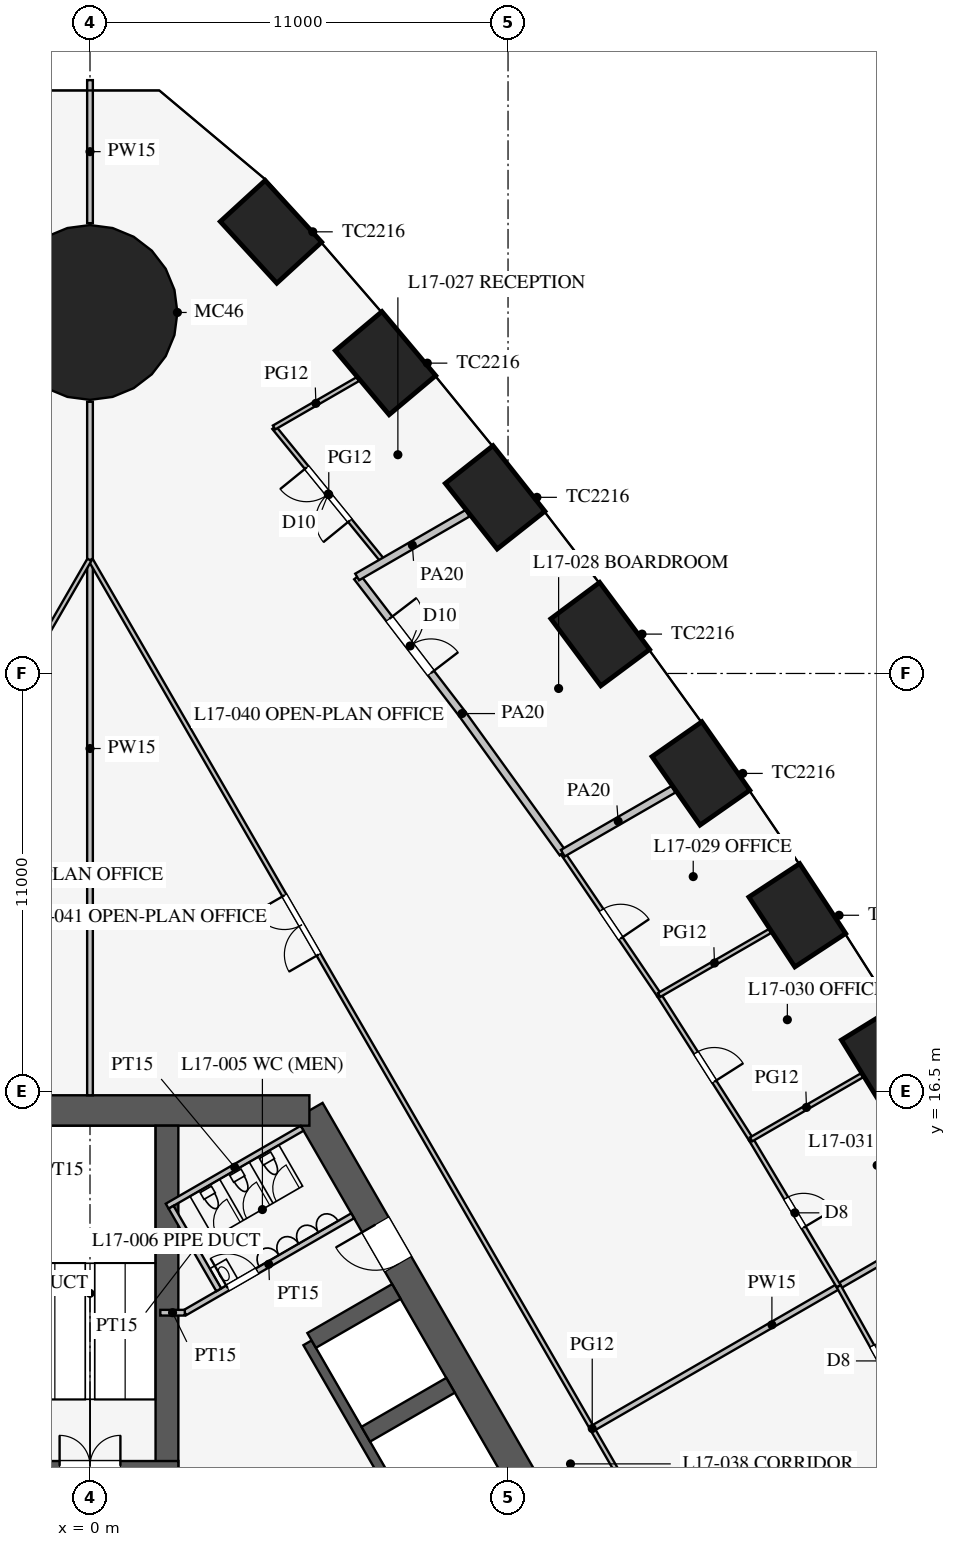
"""IFC4 building model, lengths in metres.
Left out: names, types, materials, properties, quantities, classifications, styles, units other than length and angle.
Written with IfcOpenShell. Run it as: python <this file> out.ifc"""

import sys

from ifc_helpers import new_model, si_unit, direction, frame, frame_2d, origin, origin_2d, place, context, subcontext, project, spatial, rectangle, circle, extrude, element, fill, save


model = new_model("IFC4")
c1 = context("Model", 3, precision=1e-05, world=origin(), true_north=direction((0.0, 1.0)))
c2 = subcontext(c1, "Body", "Model", "MODEL_VIEW")
j1 = project(units=[si_unit("LENGTHUNIT", "METRE"), si_unit("PLANEANGLEUNIT", "RADIAN")], contexts=[c1])
p1 = place(None, origin())
s1 = spatial("IfcSite", under=j1, at=p1, CompositionType="ELEMENT")
p2 = place(p1, origin())
s2 = spatial("IfcBuilding", under=s1, at=p2, CompositionType="ELEMENT")
p3 = place(p2, frame((0.0, 0.0, 75.3)))
s3 = spatial("IfcBuildingStorey", under=s2, at=p3, CompositionType="ELEMENT", Elevation=75.3)
for number, where, z_axis, x_axis in (
    (1, (21.031, 17.339, 0.0), (0.0, 0.0, 1.0), (-0.525, 0.851, 0.0)),
    (2, (18.611, 21.137, 0.0), (0.0, 0.0, 1.0), (-0.549, 0.836, 0.0)),
    (3, (16.076, 24.87, 0.0), (0.0, 0.0, 1.0), (-0.574, 0.819, 0.0)),
    (4, (13.426, 28.536, 0.0), (0.0, 0.0, 1.0), (-0.597, 0.802, 0.0)),
    (5, (10.66, 32.135, 0.0), (0.0, 0.0, 1.0), (-0.62, 0.784, 0.0)),
    (6, (7.776, 35.667, 0.0), (0.0, 0.0, 1.0), (-0.643, 0.766, 0.0)),
    (7, (4.762, 39.122, 0.0), (0.0, 0.0, 1.0), (-0.676, 0.737, 0.0)),
):
    element("IfcColumn", number, at=place(p3, frame(where, z_axis=z_axis, x_axis=x_axis)), inside=s3, PredefinedType="COLUMN", context=c2, shape_type="SweptSolid", body=[
        extrude(rectangle(XDim=2.2, YDim=1.6, at=origin_2d()), origin(), (0.0, 0.0, 1.0), 4.2),
    ])
p4 = place(p3, frame((0.0, 37.0, 0.0), z_axis=(0.0, 0.0, 1.0), x_axis=(1.0, 0.0, 0.0)))
e8 = element("IfcColumn", 8, at=p4, inside=s3, PredefinedType="COLUMN", context=c2, shape_type="SweptSolid", body=[
    extrude(circle(Radius=2.3, at=origin_2d()), origin(), (0.0, 0.0, 1.0), 4.2),
])
p5 = place(p3, frame((16.743, -3.0, 0.0), z_axis=(0.0, 0.0, 1.0), x_axis=(-0.500002442456, 0.866023993627, 0.0)))
e9 = element("IfcWall", 9, at=p5, inside=s3, PredefinedType="SHEAR", context=c2, shape_type="SweptSolid", body=[
    extrude(rectangle(XDim=21.939, YDim=0.8, at=frame_2d((10.97, 0.0))), origin(), (0.0, 0.0, 1.0), 4.2),
])
p6 = place(p5, frame((17.27, 0.0, 0.0)))
e10 = element("IfcOpeningElement", 10, at=p6, cuts=e9, PredefinedType="OPENING", context=c2, shape_type="SweptSolid", body=[
    extrude(rectangle(XDim=1.2, YDim=2.1, at=frame_2d((0.6, 1.05))), frame((0.0, 0.41, 0.0), z_axis=(0.0, -1.0, 0.0), x_axis=(1.0, 0.0, 0.0)), (0.0, 0.0, 1.0), 0.82),
])
p7 = place(p5, frame((3.47, 0.0, 0.0)))
e11 = element("IfcOpeningElement", 11, at=p7, cuts=e9, PredefinedType="OPENING", context=c2, shape_type="SweptSolid", body=[
    extrude(rectangle(XDim=1.2, YDim=2.1, at=frame_2d((0.6, 1.05))), frame((0.0, 0.41, 0.0), z_axis=(0.0, -1.0, 0.0), x_axis=(1.0, 0.0, 0.0)), (0.0, 0.0, 1.0), 0.82),
])
p8 = place(p3, frame((5.773, 16.0, 0.0), z_axis=(0.0, 0.0, 1.0), x_axis=(-1.0, 0.0, 0.0)))
e12 = element("IfcWall", 12, at=p8, inside=s3, PredefinedType="SHEAR", context=c2, shape_type="SweptSolid", body=[
    extrude(rectangle(XDim=11.547, YDim=0.8, at=frame_2d((5.773, 0.0))), origin(), (0.0, 0.0, 1.0), 4.2),
])
p9 = place(p3, frame((11.424, 0.014, 0.0), z_axis=(0.0, 0.0, 1.0), x_axis=(-0.500001763848, 0.866024385424, 0.0)))
e13 = element("IfcWall", 13, at=p9, inside=s3, PredefinedType="SHEAR", context=c2, shape_type="SweptSolid", body=[
    extrude(rectangle(XDim=11.4, YDim=0.25, at=frame_2d((5.7, 0.0))), origin(), (0.0, 0.0, 1.0), 4.2),
])
p10 = place(p3, frame((7.257, 7.481, 0.0), z_axis=(0.0, 0.0, 1.0), x_axis=(0.866046643894, 0.499963209246, 0.0)))
e14 = element("IfcWall", 14, at=p10, inside=s3, PredefinedType="SHEAR", context=c2, shape_type="SweptSolid", body=[
    extrude(rectangle(XDim=2.575, YDim=0.45, at=frame_2d((1.288, 0.0))), origin(), (0.0, 0.0, 1.0), 4.2),
])
p11 = place(p3, frame((5.832, 9.949, 0.0), z_axis=(0.0, 0.0, 1.0), x_axis=(0.866029291668, 0.499993265928, 0.0)))
e15 = element("IfcWall", 15, at=p11, inside=s3, PredefinedType="SHEAR", context=c2, shape_type="SweptSolid", body=[
    extrude(rectangle(XDim=2.575, YDim=0.45, at=frame_2d((1.288, 0.0))), origin(), (0.0, 0.0, 1.0), 4.2),
])
p12 = place(p3, frame((2.025, 6.525, 0.0), z_axis=(0.0, 0.0, 1.0), x_axis=(0.0, 1.0, 0.0)))
e16 = element("IfcWall", 16, at=p12, inside=s3, PredefinedType="SHEAR", context=c2, shape_type="SweptSolid", body=[
    extrude(rectangle(XDim=9.075, YDim=0.6, at=frame_2d((4.538, 0.0))), origin(), (0.0, 0.0, 1.0), 4.2),
])
p13 = place(p3, frame((2.325, 6.65, 0.0), z_axis=(0.0, 0.0, 1.0), x_axis=(-1.0, 0.0, 0.0)))
e17 = element("IfcWall", 17, at=p13, inside=s3, PredefinedType="SHEAR", context=c2, shape_type="SweptSolid", body=[
    extrude(rectangle(XDim=4.65, YDim=0.25, at=frame_2d((2.325, 0.0))), origin(), (0.0, 0.0, 1.0), 4.2),
])
p14 = place(p13, frame((1.525, 0.0, 0.0)))
e18 = element("IfcOpeningElement", 18, at=p14, cuts=e17, PredefinedType="OPENING", context=c2, shape_type="SweptSolid", body=[
    extrude(rectangle(XDim=1.6, YDim=2.1, at=frame_2d((0.8, 1.05))), frame((0.0, 0.135, 0.0), z_axis=(0.0, -1.0, 0.0), x_axis=(1.0, 0.0, 0.0)), (0.0, 0.0, 1.0), 0.27),
])
p15 = place(p3, frame((2.495, 10.678, 0.0), z_axis=(0.0, 0.0, 1.0), x_axis=(0.86602216432, 0.500005610874, 0.0)))
e19 = element("IfcWall", 19, at=p15, inside=s3, PredefinedType="PARTITIONING", context=c2, shape_type="SweptSolid", body=[
    extrude(rectangle(XDim=5.1, YDim=0.15, at=frame_2d((2.55, 0.0))), origin(), (0.0, 0.0, 1.0), 4.0),
])
p16 = place(p15, frame((1.3, 0.0, 0.0)))
e20 = element("IfcOpeningElement", 20, at=p16, cuts=e19, PredefinedType="OPENING", context=c2, shape_type="SweptSolid", body=[
    extrude(rectangle(XDim=0.9, YDim=2.1, at=frame_2d((0.45, 1.05))), frame((0.0, 0.085, 0.0), z_axis=(0.0, -1.0, 0.0), x_axis=(1.0, 0.0, 0.0)), (0.0, 0.0, 1.0), 0.17),
])
p17 = place(p3, frame((2.495, 10.678, 0.0), z_axis=(0.0, 0.0, 1.0), x_axis=(-1.0, 0.0, 0.0)))
e21 = element("IfcWall", 21, at=p17, inside=s3, PredefinedType="PARTITIONING", context=c2, shape_type="SweptSolid", body=[
    extrude(rectangle(XDim=0.645, YDim=0.15, at=frame_2d((0.323, 0.0))), origin(), (0.0, 0.0, 1.0), 4.0),
])
p18 = place(p3, frame((2.031, 13.482, 0.0), z_axis=(0.0, 0.0, 1.0), x_axis=(0.866050731258, 0.499956128963, 0.0)))
e22 = element("IfcWall", 22, at=p18, inside=s3, PredefinedType="PARTITIONING", context=c2, shape_type="SweptSolid", body=[
    extrude(rectangle(XDim=4.1, YDim=0.15, at=frame_2d((2.05, 0.0))), origin(), (0.0, 0.0, 1.0), 4.0),
])
p19 = place(p3, frame((3.389, 11.281, 0.0), z_axis=(0.0, 0.0, 1.0), x_axis=(-0.499989096993, 0.866031698547, 0.0)))
e23 = element("IfcWall", 23, at=p19, inside=s3, PredefinedType="PARTITIONING", context=c2, shape_type="SweptSolid", body=[
    extrude(rectangle(XDim=2.51, YDim=0.15, at=frame_2d((1.255, 0.0))), origin(), (0.0, 0.0, 1.0), 4.0),
])
p20 = place(p3, frame((0.0, 16.4, 0.0), z_axis=(0.0, 0.0, 1.0), x_axis=(0.0, 1.0, 0.0)))
e24 = element("IfcWall", 24, at=p20, inside=s3, PredefinedType="PARTITIONING", context=c2, shape_type="SweptSolid", body=[
    extrude(rectangle(XDim=18.25, YDim=0.15, at=frame_2d((9.125, 0.0))), origin(), (0.0, 0.0, 1.0), 2.3),
])
p21 = place(p3, frame((0.0, 39.35, 0.0), z_axis=(0.0, 0.0, 1.0), x_axis=(0.0, 1.0, 0.0)))
e25 = element("IfcWall", 25, at=p21, inside=s3, PredefinedType="PARTITIONING", context=c2, shape_type="SweptSolid", body=[
    extrude(rectangle(XDim=3.764, YDim=0.15, at=frame_2d((1.882, 0.0))), origin(), (0.0, 0.0, 1.0), 2.3),
])
p22 = place(p3, frame((13.268, 7.66, 0.0), z_axis=(0.0, 0.0, 1.0), x_axis=(0.866019550038, 0.50001013885, 0.0)))
e26 = element("IfcWall", 26, at=p22, inside=s3, PredefinedType="PARTITIONING", context=c2, shape_type="SweptSolid", body=[
    extrude(rectangle(XDim=10.799, YDim=0.15, at=frame_2d((5.399, 0.0))), origin(), (0.0, 0.0, 1.0), 2.8),
])
p23 = place(p3, frame((26.415, -15.231, 0.0), z_axis=(0.0, 0.0, 1.0), x_axis=(-0.50000091641, 0.866024874695, 0.0)))
e27 = element("IfcWall", 27, at=p23, inside=s3, PredefinedType="PARTITIONING", context=c2, shape_type="SweptSolid", body=[
    extrude(rectangle(XDim=52.796, YDim=0.12, at=frame_2d((26.398, 0.0))), origin(), (0.0, 0.0, 1.0), 2.9),
])
p24 = place(p23, frame((10.2, 0.0, 0.15)))
e28 = element("IfcOpeningElement", 28, at=p24, cuts=e27, PredefinedType="OPENING", context=c2, shape_type="SweptSolid", body=[
    extrude(rectangle(XDim=1.8, YDim=2.1, at=frame_2d((0.9, 1.05))), frame((0.0, 0.07, 0.0), z_axis=(0.0, -1.0, 0.0), x_axis=(1.0, 0.0, 0.0)), (0.0, 0.0, 1.0), 0.14),
])
p25 = place(p23, frame((40.8, 0.0, 0.15)))
e29 = element("IfcOpeningElement", 29, at=p25, cuts=e27, PredefinedType="OPENING", context=c2, shape_type="SweptSolid", body=[
    extrude(rectangle(XDim=1.8, YDim=2.1, at=frame_2d((0.9, 1.05))), frame((0.0, 0.07, 0.0), z_axis=(0.0, -1.0, 0.0), x_axis=(1.0, 0.0, 0.0)), (0.0, 0.0, 1.0), 0.14),
])
p26 = place(p3, frame((19.701, 11.374, 0.0), z_axis=(0.0, 0.0, 1.0), x_axis=(-0.512483962191, 0.858696796604, 0.0)))
e30 = element("IfcWall", 30, at=p26, inside=s3, PredefinedType="PARTITIONING", context=c2, shape_type="SweptSolid", body=[
    extrude(rectangle(XDim=4.5, YDim=0.12, at=frame_2d((2.25, 0.0))), origin(), (0.0, 0.0, 1.0), 2.9),
])
p27 = place(p26, frame((1.8, 0.0, 0.15)))
e31 = element("IfcOpeningElement", 31, at=p27, cuts=e30, PredefinedType="OPENING", context=c2, shape_type="SweptSolid", body=[
    extrude(rectangle(XDim=0.9, YDim=2.1, at=frame_2d((0.45, 1.05))), frame((0.0, 0.07, 0.0), z_axis=(0.0, -1.0, 0.0), x_axis=(1.0, 0.0, 0.0)), (0.0, 0.0, 1.0), 0.14),
])
p28 = place(p3, frame((12.441, 22.771, 0.0), z_axis=(0.0, 0.0, 1.0), x_axis=(-0.585376255171, 0.810761765183, 0.0)))
e32 = element("IfcWall", 32, at=p28, inside=s3, PredefinedType="PARTITIONING", context=c2, shape_type="SweptSolid", body=[
    extrude(rectangle(XDim=4.523, YDim=0.2, at=frame_2d((2.262, 0.0))), origin(), (0.0, 0.0, 1.0), 2.9),
])
p29 = place(p3, frame((9.793, 26.439, 0.0), z_axis=(0.0, 0.0, 1.0), x_axis=(-0.608784932975, 0.79333530451, 0.0)))
e33 = element("IfcWall", 33, at=p29, inside=s3, PredefinedType="PARTITIONING", context=c2, shape_type="SweptSolid", body=[
    extrude(rectangle(XDim=4.539, YDim=0.2, at=frame_2d((2.27, 0.0))), origin(), (0.0, 0.0, 1.0), 2.9),
])
p30 = place(p29, frame((1.35, 0.0, 0.15)))
e34 = element("IfcOpeningElement", 34, at=p30, cuts=e33, PredefinedType="OPENING", context=c2, shape_type="SweptSolid", body=[
    extrude(rectangle(XDim=1.8, YDim=2.1, at=frame_2d((0.9, 1.05))), frame((0.0, 0.11, 0.0), z_axis=(0.0, -1.0, 0.0), x_axis=(1.0, 0.0, 0.0)), (0.0, 0.0, 1.0), 0.22),
])
p31 = place(p3, frame((7.723, 30.439, 0.0), z_axis=(0.0, 0.0, 1.0), x_axis=(-0.631807650035, 0.775125211406, 0.0)))
e35 = element("IfcWall", 35, at=p31, inside=s3, PredefinedType="PARTITIONING", context=c2, shape_type="SweptSolid", body=[
    extrude(rectangle(XDim=4.559, YDim=0.12, at=frame_2d((2.279, 0.0))), origin(), (0.0, 0.0, 1.0), 2.9),
])
p32 = place(p31, frame((1.4, 0.0, 0.15)))
e36 = element("IfcOpeningElement", 36, at=p32, cuts=e35, PredefinedType="OPENING", context=c2, shape_type="SweptSolid", body=[
    extrude(rectangle(XDim=1.8, YDim=2.1, at=frame_2d((0.9, 1.05))), frame((0.0, 0.07, 0.0), z_axis=(0.0, -1.0, 0.0), x_axis=(1.0, 0.0, 0.0)), (0.0, 0.0, 1.0), 0.14),
])
p33 = place(p3, frame((17.395, 15.239, 0.0), z_axis=(0.0, 0.0, 1.0), x_axis=(-0.537243691336, 0.843427066272, 0.0)))
e37 = element("IfcWall", 37, at=p33, inside=s3, PredefinedType="PARTITIONING", context=c2, shape_type="SweptSolid", body=[
    extrude(rectangle(XDim=4.504, YDim=0.12, at=frame_2d((2.252, 0.0))), origin(), (0.0, 0.0, 1.0), 2.9),
])
p34 = place(p33, frame((1.8, 0.0, 0.15)))
e38 = element("IfcOpeningElement", 38, at=p34, cuts=e37, PredefinedType="OPENING", context=c2, shape_type="SweptSolid", body=[
    extrude(rectangle(XDim=0.9, YDim=2.1, at=frame_2d((0.45, 1.05))), frame((0.0, 0.07, 0.0), z_axis=(0.0, -1.0, 0.0), x_axis=(1.0, 0.0, 0.0)), (0.0, 0.0, 1.0), 0.14),
])
p35 = place(p3, frame((14.975, 19.038, 0.0), z_axis=(0.0, 0.0, 1.0), x_axis=(-0.561512004239, 0.827468591002, 0.0)))
e39 = element("IfcWall", 39, at=p35, inside=s3, PredefinedType="PARTITIONING", context=c2, shape_type="SweptSolid", body=[
    extrude(rectangle(XDim=4.512, YDim=0.12, at=frame_2d((2.256, 0.0))), origin(), (0.0, 0.0, 1.0), 2.9),
])
p36 = place(p35, frame((1.8, 0.0, 0.15)))
e40 = element("IfcOpeningElement", 40, at=p36, cuts=e39, PredefinedType="OPENING", context=c2, shape_type="SweptSolid", body=[
    extrude(rectangle(XDim=0.9, YDim=2.1, at=frame_2d((0.45, 1.05))), frame((0.0, 0.07, 0.0), z_axis=(0.0, -1.0, 0.0), x_axis=(1.0, 0.0, 0.0)), (0.0, 0.0, 1.0), 0.14),
])
p37 = place(p3, frame((21.895, 7.445, 0.0), z_axis=(0.0, 0.0, 1.0), x_axis=(-0.487415216275, 0.87317031955, 0.0)))
e41 = element("IfcWall", 41, at=p37, inside=s3, PredefinedType="PARTITIONING", context=c2, shape_type="SweptSolid", body=[
    extrude(rectangle(XDim=4.5, YDim=0.12, at=frame_2d((2.25, 0.0))), origin(), (0.0, 0.0, 1.0), 2.9),
])
p38 = place(p37, frame((1.8, 0.0, 0.15)))
e42 = element("IfcOpeningElement", 42, at=p38, cuts=e41, PredefinedType="OPENING", context=c2, shape_type="SweptSolid", body=[
    extrude(rectangle(XDim=0.9, YDim=2.1, at=frame_2d((0.45, 1.05))), frame((0.0, 0.07, 0.0), z_axis=(0.0, -1.0, 0.0), x_axis=(1.0, 0.0, 0.0)), (0.0, 0.0, 1.0), 0.14),
])
p39 = place(p3, frame((12.441, 22.771, 0.0), z_axis=(0.0, 0.0, 1.0), x_axis=(0.865992196602, 0.500057512117, 0.0)))
e43 = element("IfcWall", 43, at=p39, inside=s3, PredefinedType="PARTITIONING", context=c2, shape_type="SweptSolid", body=[
    extrude(rectangle(XDim=3.364, YDim=0.2, at=frame_2d((1.682, 0.0))), origin(), (0.0, 0.0, 1.0), 2.6),
])
p40 = place(p3, frame((7.03, 30.04, 0.0), z_axis=(0.0, 0.0, 1.0), x_axis=(0.866038859646, 0.49997669304, 0.0)))
e44 = element("IfcWall", 44, at=p40, inside=s3, PredefinedType="PARTITIONING", context=c2, shape_type="SweptSolid", body=[
    extrude(rectangle(XDim=3.353, YDim=0.2, at=frame_2d((1.676, 0.0))), origin(), (0.0, 0.0, 1.0), 2.8),
])
p41 = place(p3, frame((4.843, 33.973, 0.0), z_axis=(0.0, 0.0, 1.0), x_axis=(0.866014639343, 0.500018644096, 0.0)))
e45 = element("IfcWall", 45, at=p41, inside=s3, PredefinedType="PARTITIONING", context=c2, shape_type="SweptSolid", body=[
    extrude(rectangle(XDim=2.545, YDim=0.12, at=frame_2d((1.272, 0.0))), origin(), (0.0, 0.0, 1.0), 2.9),
])
p42 = place(p3, frame((17.395, 15.239, 0.0), z_axis=(0.0, 0.0, 1.0), x_axis=(0.865991297194, 0.500059069696, 0.0)))
e46 = element("IfcWall", 46, at=p42, inside=s3, PredefinedType="PARTITIONING", context=c2, shape_type="SweptSolid", body=[
    extrude(rectangle(XDim=3.369, YDim=0.12, at=frame_2d((1.685, 0.0))), origin(), (0.0, 0.0, 1.0), 2.8),
])
p43 = place(p3, frame((14.975, 19.038, 0.0), z_axis=(0.0, 0.0, 1.0), x_axis=(0.866039498442, 0.499975586543, 0.0)))
e47 = element("IfcWall", 47, at=p43, inside=s3, PredefinedType="PARTITIONING", context=c2, shape_type="SweptSolid", body=[
    extrude(rectangle(XDim=3.367, YDim=0.12, at=frame_2d((1.684, 0.0))), origin(), (0.0, 0.0, 1.0), 2.8),
])
p44 = place(p3, frame((-0.016, 30.491, 0.0), z_axis=(0.0, 0.0, 1.0), x_axis=(-0.50000091641, -0.866024874695, 0.0)))
e48 = element("IfcWall", 48, at=p44, inside=s3, PredefinedType="PARTITIONING", context=c2, shape_type="SweptSolid", body=[
    extrude(rectangle(XDim=52.796, YDim=0.12, at=frame_2d((26.398, 0.0))), origin(), (0.0, 0.0, 1.0), 2.9),
])
p45 = place(p44, frame((10.2, 0.0, 0.15)))
e49 = element("IfcOpeningElement", 49, at=p45, cuts=e48, PredefinedType="OPENING", context=c2, shape_type="SweptSolid", body=[
    extrude(rectangle(XDim=1.8, YDim=2.1, at=frame_2d((0.9, 1.05))), frame((0.0, 0.07, 0.0), z_axis=(0.0, -1.0, 0.0), x_axis=(1.0, 0.0, 0.0)), (0.0, 0.0, 1.0), 0.14),
])
p46 = place(p44, frame((40.8, 0.0, 0.15)))
e50 = element("IfcOpeningElement", 50, at=p46, cuts=e48, PredefinedType="OPENING", context=c2, shape_type="SweptSolid", body=[
    extrude(rectangle(XDim=1.8, YDim=2.1, at=frame_2d((0.9, 1.05))), frame((0.0, 0.07, 0.0), z_axis=(0.0, -1.0, 0.0), x_axis=(1.0, 0.0, 0.0)), (0.0, 0.0, 1.0), 0.14),
])
p47 = place(p16, origin())
e51 = element("IfcDoor", 51, at=p47, inside=s3, OperationType="SINGLE_SWING_LEFT", PredefinedType="DOOR", context=c2, shape_type="SweptSolid", body=[
    extrude(rectangle(XDim=0.9, YDim=2.1, at=frame_2d((0.45, 1.05))), frame((0.0, 0.025, 0.0), z_axis=(0.0, -1.0, 0.0), x_axis=(1.0, 0.0, 0.0)), (0.0, 0.0, 1.0), 0.05),
])
fill(e20, e51)
p48 = place(p14, frame((1.6, 0.0, 0.0), z_axis=(0.0, 0.0, 1.0), x_axis=(-1.0, 0.0, 0.0)))
e52 = element("IfcDoor", 52, at=p48, inside=s3, OperationType="DOUBLE_DOOR_SINGLE_SWING", PredefinedType="DOOR", context=c2, shape_type="SweptSolid", body=[
    extrude(rectangle(XDim=1.6, YDim=2.1, at=frame_2d((0.8, 1.05))), frame((0.0, 0.025, 0.0), z_axis=(0.0, -1.0, 0.0), x_axis=(1.0, 0.0, 0.0)), (0.0, 0.0, 1.0), 0.05),
])
fill(e18, e52)
p49 = place(p6, origin())
e53 = element("IfcDoor", 53, at=p49, inside=s3, OperationType="SINGLE_SWING_RIGHT", PredefinedType="DOOR", context=c2, shape_type="SweptSolid", body=[
    extrude(rectangle(XDim=1.2, YDim=2.1, at=frame_2d((0.6, 1.05))), frame((0.0, 0.025, 0.0), z_axis=(0.0, -1.0, 0.0), x_axis=(1.0, 0.0, 0.0)), (0.0, 0.0, 1.0), 0.05),
])
fill(e10, e53)
p50 = place(p32, origin())
e54 = element("IfcDoor", 54, at=p50, inside=s3, OperationType="DOUBLE_DOOR_SINGLE_SWING", PredefinedType="DOOR", context=c2, shape_type="SweptSolid", body=[
    extrude(rectangle(XDim=1.8, YDim=2.1, at=frame_2d((0.9, 1.05))), frame((0.0, 0.025, 0.0), z_axis=(0.0, -1.0, 0.0), x_axis=(1.0, 0.0, 0.0)), (0.0, 0.0, 1.0), 0.05),
])
fill(e36, e54)
p51 = place(p30, frame((1.8, 0.0, 0.0), z_axis=(0.0, 0.0, 1.0), x_axis=(-1.0, 0.0, 0.0)))
e55 = element("IfcDoor", 55, at=p51, inside=s3, OperationType="DOUBLE_DOOR_SINGLE_SWING", PredefinedType="DOOR", context=c2, shape_type="SweptSolid", body=[
    extrude(rectangle(XDim=1.8, YDim=2.1, at=frame_2d((0.9, 1.05))), frame((0.0, 0.025, 0.0), z_axis=(0.0, -1.0, 0.0), x_axis=(1.0, 0.0, 0.0)), (0.0, 0.0, 1.0), 0.05),
])
fill(e34, e55)
p52 = place(p36, frame((0.9, 0.0, 0.0), z_axis=(0.0, 0.0, 1.0), x_axis=(-1.0, 0.0, 0.0)))
e56 = element("IfcDoor", 56, at=p52, inside=s3, OperationType="SINGLE_SWING_RIGHT", PredefinedType="DOOR", context=c2, shape_type="SweptSolid", body=[
    extrude(rectangle(XDim=0.9, YDim=2.1, at=frame_2d((0.45, 1.05))), frame((0.0, 0.025, 0.0), z_axis=(0.0, -1.0, 0.0), x_axis=(1.0, 0.0, 0.0)), (0.0, 0.0, 1.0), 0.05),
])
fill(e40, e56)
p53 = place(p34, frame((0.9, 0.0, 0.0), z_axis=(0.0, 0.0, 1.0), x_axis=(-1.0, 0.0, 0.0)))
e57 = element("IfcDoor", 57, at=p53, inside=s3, OperationType="SINGLE_SWING_RIGHT", PredefinedType="DOOR", context=c2, shape_type="SweptSolid", body=[
    extrude(rectangle(XDim=0.9, YDim=2.1, at=frame_2d((0.45, 1.05))), frame((0.0, 0.025, 0.0), z_axis=(0.0, -1.0, 0.0), x_axis=(1.0, 0.0, 0.0)), (0.0, 0.0, 1.0), 0.05),
])
fill(e38, e57)
p54 = place(p27, frame((0.9, 0.0, 0.0), z_axis=(0.0, 0.0, 1.0), x_axis=(-1.0, 0.0, 0.0)))
e58 = element("IfcDoor", 58, at=p54, inside=s3, OperationType="SINGLE_SWING_RIGHT", PredefinedType="DOOR", context=c2, shape_type="SweptSolid", body=[
    extrude(rectangle(XDim=0.9, YDim=2.1, at=frame_2d((0.45, 1.05))), frame((0.0, 0.025, 0.0), z_axis=(0.0, -1.0, 0.0), x_axis=(1.0, 0.0, 0.0)), (0.0, 0.0, 1.0), 0.05),
])
fill(e31, e58)
p55 = place(p38, frame((0.9, 0.0, 0.0), z_axis=(0.0, 0.0, 1.0), x_axis=(-1.0, 0.0, 0.0)))
e59 = element("IfcDoor", 59, at=p55, inside=s3, OperationType="SINGLE_SWING_RIGHT", PredefinedType="DOOR", context=c2, shape_type="SweptSolid", body=[
    extrude(rectangle(XDim=0.9, YDim=2.1, at=frame_2d((0.45, 1.05))), frame((0.0, 0.025, 0.0), z_axis=(0.0, -1.0, 0.0), x_axis=(1.0, 0.0, 0.0)), (0.0, 0.0, 1.0), 0.05),
])
fill(e42, e59)
p56 = place(p25, origin())
e60 = element("IfcDoor", 60, at=p56, inside=s3, OperationType="DOUBLE_DOOR_SINGLE_SWING", PredefinedType="DOOR", context=c2, shape_type="SweptSolid", body=[
    extrude(rectangle(XDim=1.8, YDim=2.1, at=frame_2d((0.9, 1.05))), frame((0.0, 0.025, 0.0), z_axis=(0.0, -1.0, 0.0), x_axis=(1.0, 0.0, 0.0)), (0.0, 0.0, 1.0), 0.05),
])
fill(e29, e60)
save(model, sys.argv[1])
